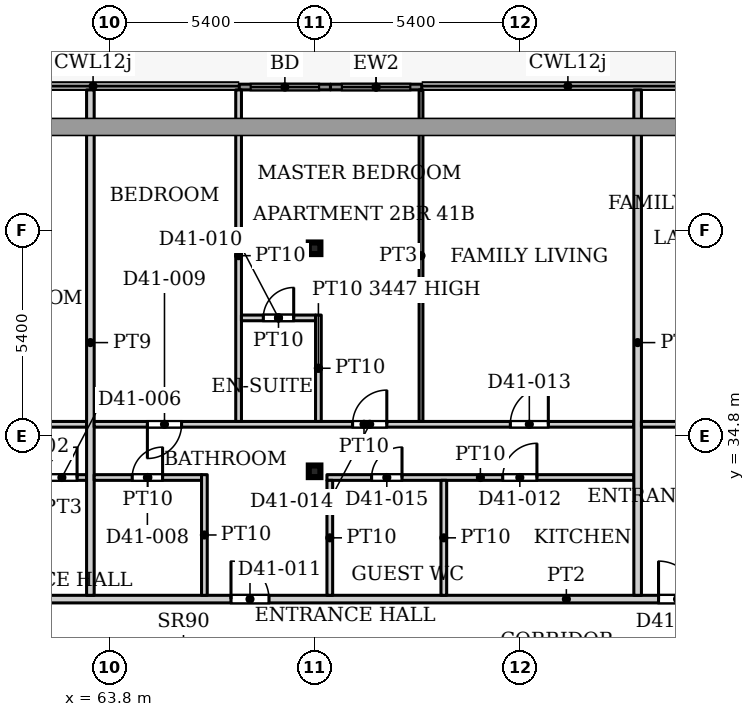
"""IFC4 building model, lengths in metres.
Left out: names, types, materials, properties, quantities, classifications, styles, units other than length and angle.
Written with IfcOpenShell. Run it as: python <this file> out.ifc"""

import sys

from ifc_helpers import new_model, si_unit, direction, frame, frame_2d, origin, origin_2d, place, context, subcontext, project, spatial, rectangle, hollow_rectangle, extrude, source, transform, mapped, element, fill, save


model = new_model("IFC4")
c1 = context("Model", 3, precision=1e-05, world=origin(), true_north=direction((0.0, 1.0)))
c2 = subcontext(c1, "Body", "Model", "MODEL_VIEW")
j1 = project(units=[si_unit("LENGTHUNIT", "METRE"), si_unit("PLANEANGLEUNIT", "RADIAN")], contexts=[c1])
p1 = place(None, origin())
s1 = spatial("IfcSite", under=j1, at=p1, CompositionType="ELEMENT")
p2 = place(p1, origin())
s2 = spatial("IfcBuilding", under=s1, at=p2, CompositionType="ELEMENT")
p3 = place(p2, frame((0.0, 0.0, 176.0)))
s3 = spatial("IfcBuildingStorey", under=s2, at=p3, CompositionType="ELEMENT", Elevation=176.0)
for number, where, z_axis, x_axis in (
    (1, (69.2, 33.863, 0.0), (0.0, 0.0, 1.0), (1.0, 0.0, 0.0)),
    (2, (69.2, 39.732, 0.0), (0.0, 0.0, 1.0), (1.0, 0.0, 0.0)),
):
    element("IfcColumn", number, at=place(p3, frame(where, z_axis=z_axis, x_axis=x_axis)), inside=s3, PredefinedType="COLUMN", context=c2, shape_type="SweptSolid", body=[
        extrude(hollow_rectangle(XDim=0.305, YDim=0.305, WallThickness=0.016, InnerFilletRadius=0.016, OuterFilletRadius=0.032, at=origin_2d()), origin(), (0.0, 0.0, 1.0), 3.9),
    ])
p4 = place(p3, frame((67.218, 43.975, 0.0), z_axis=(0.0, 0.0, 1.0), x_axis=(1.0, 0.0, 0.0)))
e3 = element("IfcWall", 3, at=p4, inside=s3, PredefinedType="SOLIDWALL", context=c2, shape_type="SweptSolid", body=[
    extrude(rectangle(XDim=2.4, YDim=0.15, at=frame_2d((1.2, 0.0))), origin(), (0.0, 0.0, 1.0), 3.75),
])
p5 = place(p4, frame((0.3, 0.0, 0.0)))
e4 = element("IfcOpeningElement", 4, at=p5, cuts=e3, PredefinedType="OPENING", context=c2, shape_type="SweptSolid", body=[
    extrude(rectangle(XDim=1.8, YDim=2.4, at=frame_2d((0.9, 1.2))), frame((0.0, 0.085, 0.0), z_axis=(0.0, -1.0, 0.0), x_axis=(1.0, 0.0, 0.0)), (0.0, 0.0, 1.0), 0.17),
])
p6 = place(p3, frame((69.618, 43.975, 0.0), z_axis=(0.0, 0.0, 1.0), x_axis=(1.0, 0.0, 0.0)))
e5 = element("IfcWall", 5, at=p6, inside=s3, PredefinedType="SOLIDWALL", context=c2, shape_type="SweptSolid", body=[
    extrude(rectangle(XDim=2.4, YDim=0.15, at=frame_2d((1.2, 0.0))), origin(), (0.0, 0.0, 1.0), 3.75),
])
p7 = place(p6, frame((0.3, 0.0, 0.0)))
e6 = element("IfcOpeningElement", 6, at=p7, cuts=e5, PredefinedType="OPENING", context=c2, shape_type="SweptSolid", body=[
    extrude(rectangle(XDim=1.8, YDim=2.4, at=frame_2d((0.9, 1.2))), frame((0.0, 0.085, 0.0), z_axis=(0.0, -1.0, 0.0), x_axis=(1.0, 0.0, 0.0)), (0.0, 0.0, 1.0), 0.17),
])
p8 = place(p3, frame((53.549, 30.5, 0.0), z_axis=(0.0, 0.0, 1.0), x_axis=(1.0, 0.0, 0.0)))
e7 = element("IfcWall", 7, at=p8, inside=s3, PredefinedType="PARTITIONING", context=c2, shape_type="SweptSolid", body=[
    extrude(rectangle(XDim=44.551, YDim=0.2, at=frame_2d((22.275, 0.0))), origin(), (0.0, 0.0, 1.0), 3.6),
])
p9 = place(p8, frame((6.851, 0.0, 0.0)))
e8 = element("IfcOpeningElement", 8, at=p9, cuts=e7, PredefinedType="OPENING", context=c2, shape_type="SweptSolid", body=[
    extrude(rectangle(XDim=1.0, YDim=2.1, at=frame_2d((0.5, 1.05))), frame((0.0, 0.11, 0.0), z_axis=(0.0, -1.0, 0.0), x_axis=(1.0, 0.0, 0.0)), (0.0, 0.0, 1.0), 0.22),
])
p10 = place(p8, frame((13.451, 0.0, 0.0)))
e9 = element("IfcOpeningElement", 9, at=p10, cuts=e7, PredefinedType="OPENING", context=c2, shape_type="SweptSolid", body=[
    extrude(rectangle(XDim=1.0, YDim=2.1, at=frame_2d((0.5, 1.05))), frame((0.0, 0.11, 0.0), z_axis=(0.0, -1.0, 0.0), x_axis=(1.0, 0.0, 0.0)), (0.0, 0.0, 1.0), 0.22),
])
p11 = place(p8, frame((24.701, 0.0, 0.0)))
e10 = element("IfcOpeningElement", 10, at=p11, cuts=e7, PredefinedType="OPENING", context=c2, shape_type="SweptSolid", body=[
    extrude(rectangle(XDim=1.0, YDim=2.1, at=frame_2d((0.5, 1.05))), frame((0.0, 0.11, 0.0), z_axis=(0.0, -1.0, 0.0), x_axis=(1.0, 0.0, 0.0)), (0.0, 0.0, 1.0), 0.22),
])
p12 = place(p8, frame((38.651, 0.0, 0.0)))
e11 = element("IfcOpeningElement", 11, at=p12, cuts=e7, PredefinedType="OPENING", context=c2, shape_type="SweptSolid", body=[
    extrude(rectangle(XDim=1.0, YDim=2.1, at=frame_2d((0.5, 1.05))), frame((0.0, 0.11, 0.0), z_axis=(0.0, -1.0, 0.0), x_axis=(1.0, 0.0, 0.0)), (0.0, 0.0, 1.0), 0.22),
])
p13 = place(p3, frame((53.549, 35.1, 0.0), z_axis=(0.0, 0.0, 1.0), x_axis=(1.0, 0.0, 0.0)))
e12 = element("IfcWall", 12, at=p13, inside=s3, PredefinedType="PARTITIONING", context=c2, shape_type="SweptSolid", body=[
    extrude(rectangle(XDim=9.651, YDim=0.15, at=frame_2d((4.825, 0.0))), origin(), (0.0, 0.0, 1.0), 3.6),
])
p14 = place(p13, frame((7.651, 0.0, 0.0)))
e13 = element("IfcOpeningElement", 13, at=p14, cuts=e12, PredefinedType="OPENING", context=c2, shape_type="SweptSolid", body=[
    extrude(rectangle(XDim=0.9, YDim=2.1, at=frame_2d((0.45, 1.05))), frame((0.0, 0.085, 0.0), z_axis=(0.0, -1.0, 0.0), x_axis=(1.0, 0.0, 0.0)), (0.0, 0.0, 1.0), 0.17),
])
p15 = place(p13, frame((2.651, 0.0, 0.0)))
e14 = element("IfcOpeningElement", 14, at=p15, cuts=e12, PredefinedType="OPENING", context=c2, shape_type="SweptSolid", body=[
    extrude(rectangle(XDim=1.0, YDim=2.1, at=frame_2d((0.5, 1.05))), frame((0.0, 0.085, 0.0), z_axis=(0.0, -1.0, 0.0), x_axis=(1.0, 0.0, 0.0)), (0.0, 0.0, 1.0), 0.17),
])
p16 = place(p3, frame((61.75, 33.7, 0.0), z_axis=(0.0, 0.0, 1.0), x_axis=(1.0, 0.0, 0.0)))
e15 = element("IfcWall", 15, at=p16, inside=s3, PredefinedType="PARTITIONING", context=c2, shape_type="SweptSolid", body=[
    extrude(rectangle(XDim=1.45, YDim=0.15, at=frame_2d((0.725, 0.0))), origin(), (0.0, 0.0, 1.0), 3.6),
])
p17 = place(p16, frame((0.4, 0.0, 0.0)))
e16 = element("IfcOpeningElement", 16, at=p17, cuts=e15, PredefinedType="OPENING", context=c2, shape_type="SweptSolid", body=[
    extrude(rectangle(XDim=0.8, YDim=2.1, at=frame_2d((0.4, 1.05))), frame((0.0, 0.085, 0.0), z_axis=(0.0, -1.0, 0.0), x_axis=(1.0, 0.0, 0.0)), (0.0, 0.0, 1.0), 0.17),
])
p18 = place(p3, frame((63.3, 30.6, 0.0), z_axis=(0.0, 0.0, 1.0), x_axis=(0.0, 1.0, 0.0)))
e17 = element("IfcWall", 17, at=p18, inside=s3, PredefinedType="PARTITIONING", context=c2, shape_type="SweptSolid", body=[
    extrude(rectangle(XDim=13.3, YDim=0.2, at=frame_2d((6.65, 0.0))), origin(), (0.0, 0.0, 1.0), 3.6),
])
p19 = place(p3, frame((63.4, 33.7, 0.0), z_axis=(0.0, 0.0, 1.0), x_axis=(1.0, 0.0, 0.0)))
e18 = element("IfcWall", 18, at=p19, inside=s3, PredefinedType="PARTITIONING", context=c2, shape_type="SweptSolid", body=[
    extrude(rectangle(XDim=2.825, YDim=0.15, at=frame_2d((1.413, 0.0))), origin(), (0.0, 0.0, 1.0), 3.6),
])
p20 = place(p19, frame((1.0, 0.0, 0.0)))
e19 = element("IfcOpeningElement", 19, at=p20, cuts=e18, PredefinedType="OPENING", context=c2, shape_type="SweptSolid", body=[
    extrude(rectangle(XDim=0.8, YDim=2.1, at=frame_2d((0.4, 1.05))), frame((0.0, 0.085, 0.0), z_axis=(0.0, -1.0, 0.0), x_axis=(1.0, 0.0, 0.0)), (0.0, 0.0, 1.0), 0.17),
])
p21 = place(p3, frame((63.4, 35.1, 0.0), z_axis=(0.0, 0.0, 1.0), x_axis=(1.0, 0.0, 0.0)))
e20 = element("IfcWall", 20, at=p21, inside=s3, PredefinedType="PARTITIONING", context=c2, shape_type="SweptSolid", body=[
    extrude(rectangle(XDim=14.2, YDim=0.15, at=frame_2d((7.1, 0.0))), origin(), (0.0, 0.0, 1.0), 3.6),
])
p22 = place(p21, frame((1.4, 0.0, 0.0)))
e21 = element("IfcOpeningElement", 21, at=p22, cuts=e20, PredefinedType="OPENING", context=c2, shape_type="SweptSolid", body=[
    extrude(rectangle(XDim=0.9, YDim=2.1, at=frame_2d((0.45, 1.05))), frame((0.0, 0.085, 0.0), z_axis=(0.0, -1.0, 0.0), x_axis=(1.0, 0.0, 0.0)), (0.0, 0.0, 1.0), 0.17),
])
p23 = place(p21, frame((10.95, 0.0, 0.0)))
e22 = element("IfcOpeningElement", 22, at=p23, cuts=e20, PredefinedType="OPENING", context=c2, shape_type="SweptSolid", body=[
    extrude(rectangle(XDim=1.0, YDim=2.1, at=frame_2d((0.5, 1.05))), frame((0.0, 0.085, 0.0), z_axis=(0.0, -1.0, 0.0), x_axis=(1.0, 0.0, 0.0)), (0.0, 0.0, 1.0), 0.17),
])
p24 = place(p21, frame((6.8, 0.0, 0.0)))
e23 = element("IfcOpeningElement", 23, at=p24, cuts=e20, PredefinedType="OPENING", context=c2, shape_type="SweptSolid", body=[
    extrude(rectangle(XDim=0.9, YDim=2.1, at=frame_2d((0.45, 1.05))), frame((0.0, 0.085, 0.0), z_axis=(0.0, -1.0, 0.0), x_axis=(1.0, 0.0, 0.0)), (0.0, 0.0, 1.0), 0.17),
])
p25 = place(p3, frame((66.3, 30.6, 0.0), z_axis=(0.0, 0.0, 1.0), x_axis=(0.0, 1.0, 0.0)))
e24 = element("IfcWall", 24, at=p25, inside=s3, PredefinedType="PARTITIONING", context=c2, shape_type="SweptSolid", body=[
    extrude(rectangle(XDim=3.175, YDim=0.15, at=frame_2d((1.587, 0.0))), origin(), (0.0, 0.0, 1.0), 3.6),
])
p26 = place(p3, frame((67.2, 35.175, 0.0), z_axis=(0.0, 0.0, 1.0), x_axis=(0.0, 1.0, 0.0)))
e25 = element("IfcWall", 25, at=p26, inside=s3, PredefinedType="PARTITIONING", context=c2, shape_type="SweptSolid", body=[
    extrude(rectangle(XDim=8.725, YDim=0.15, at=frame_2d((4.362, 0.0))), origin(), (0.0, 0.0, 1.0), 3.6),
])
p27 = place(p3, frame((67.275, 37.9, 0.0), z_axis=(0.0, 0.0, 1.0), x_axis=(1.0, 0.0, 0.0)))
e26 = element("IfcWall", 26, at=p27, inside=s3, PredefinedType="PARTITIONING", context=c2, shape_type="SweptSolid", body=[
    extrude(rectangle(XDim=1.95, YDim=0.15, at=frame_2d((0.975, 0.0))), origin(), (0.0, 0.0, 1.0), 3.6),
])
p28 = place(p27, frame((0.575, 0.0, 0.0)))
e27 = element("IfcOpeningElement", 27, at=p28, cuts=e26, PredefinedType="OPENING", context=c2, shape_type="SweptSolid", body=[
    extrude(rectangle(XDim=0.8, YDim=2.1, at=frame_2d((0.4, 1.05))), frame((0.0, 0.085, 0.0), z_axis=(0.0, -1.0, 0.0), x_axis=(1.0, 0.0, 0.0)), (0.0, 0.0, 1.0), 0.17),
])
p29 = place(p3, frame((69.3, 35.175, 0.0), z_axis=(0.0, 0.0, 1.0), x_axis=(0.0, 1.0, 0.0)))
e28 = element("IfcWall", 28, at=p29, inside=s3, PredefinedType="PARTITIONING", context=c2, shape_type="SweptSolid", body=[
    extrude(rectangle(XDim=2.8, YDim=0.15, at=frame_2d((1.4, 0.0))), origin(), (0.0, 0.0, 1.0), 3.447),
])
p30 = place(p3, frame((69.525, 33.7, 0.0), z_axis=(0.0, 0.0, 1.0), x_axis=(1.0, 0.0, 0.0)))
e29 = element("IfcWall", 29, at=p30, inside=s3, PredefinedType="PARTITIONING", context=c2, shape_type="SweptSolid", body=[
    extrude(rectangle(XDim=8.075, YDim=0.15, at=frame_2d((4.038, 0.0))), origin(), (0.0, 0.0, 1.0), 3.6),
])
p31 = place(p30, frame((4.625, 0.0, 0.0)))
e30 = element("IfcOpeningElement", 30, at=p31, cuts=e29, PredefinedType="OPENING", context=c2, shape_type="SweptSolid", body=[
    extrude(rectangle(XDim=0.9, YDim=2.1, at=frame_2d((0.45, 1.05))), frame((0.0, 0.085, 0.0), z_axis=(0.0, -1.0, 0.0), x_axis=(1.0, 0.0, 0.0)), (0.0, 0.0, 1.0), 0.17),
])
p32 = place(p30, frame((1.175, 0.0, 0.0)))
e31 = element("IfcOpeningElement", 31, at=p32, cuts=e29, PredefinedType="OPENING", context=c2, shape_type="SweptSolid", body=[
    extrude(rectangle(XDim=0.8, YDim=2.1, at=frame_2d((0.4, 1.05))), frame((0.0, 0.085, 0.0), z_axis=(0.0, -1.0, 0.0), x_axis=(1.0, 0.0, 0.0)), (0.0, 0.0, 1.0), 0.17),
])
p33 = place(p3, frame((69.6, 30.6, 0.0), z_axis=(0.0, 0.0, 1.0), x_axis=(0.0, 1.0, 0.0)))
e32 = element("IfcWall", 32, at=p33, inside=s3, PredefinedType="PARTITIONING", context=c2, shape_type="SweptSolid", body=[
    extrude(rectangle(XDim=3.025, YDim=0.15, at=frame_2d((1.512, 0.0))), origin(), (0.0, 0.0, 1.0), 3.6),
])
p34 = place(p3, frame((72.0, 35.175, 0.0), z_axis=(0.0, 0.0, 1.0), x_axis=(0.0, 1.0, 0.0)))
e33 = element("IfcWall", 33, at=p34, inside=s3, PredefinedType="PARTITIONING", context=c2, shape_type="SweptSolid", body=[
    extrude(rectangle(XDim=8.725, YDim=0.1, at=frame_2d((4.362, 0.0))), origin(), (0.0, 0.0, 1.0), 3.6),
])
p35 = place(p3, frame((72.6, 30.6, 0.0), z_axis=(0.0, 0.0, 1.0), x_axis=(0.0, 1.0, 0.0)))
e34 = element("IfcWall", 34, at=p35, inside=s3, PredefinedType="PARTITIONING", context=c2, shape_type="SweptSolid", body=[
    extrude(rectangle(XDim=3.025, YDim=0.15, at=frame_2d((1.512, 0.0))), origin(), (0.0, 0.0, 1.0), 3.6),
])
p36 = place(p3, frame((77.7, 30.6, 0.0), z_axis=(0.0, 0.0, 1.0), x_axis=(0.0, 1.0, 0.0)))
e35 = element("IfcWall", 35, at=p36, inside=s3, PredefinedType="PARTITIONING", context=c2, shape_type="SweptSolid", body=[
    extrude(rectangle(XDim=13.3, YDim=0.2, at=frame_2d((6.65, 0.0))), origin(), (0.0, 0.0, 1.0), 3.6),
])
p37 = place(p3, frame((77.8, 35.1, 0.0), z_axis=(0.0, 0.0, 1.0), x_axis=(1.0, 0.0, 0.0)))
e36 = element("IfcWall", 36, at=p37, inside=s3, PredefinedType="PARTITIONING", context=c2, shape_type="SweptSolid", body=[
    extrude(rectangle(XDim=11.8, YDim=0.15, at=frame_2d((5.9, 0.0))), origin(), (0.0, 0.0, 1.0), 3.6),
])
p38 = place(p37, frame((5.6, 0.0, 0.0)))
e37 = element("IfcOpeningElement", 37, at=p38, cuts=e36, PredefinedType="OPENING", context=c2, shape_type="SweptSolid", body=[
    extrude(rectangle(XDim=0.9, YDim=2.1, at=frame_2d((0.45, 1.05))), frame((0.0, 0.085, 0.0), z_axis=(0.0, -1.0, 0.0), x_axis=(1.0, 0.0, 0.0)), (0.0, 0.0, 1.0), 0.17),
])
p39 = place(p37, frame((1.5, 0.0, 0.0)))
e38 = element("IfcOpeningElement", 38, at=p39, cuts=e36, PredefinedType="OPENING", context=c2, shape_type="SweptSolid", body=[
    extrude(rectangle(XDim=1.0, YDim=2.1, at=frame_2d((0.5, 1.05))), frame((0.0, 0.085, 0.0), z_axis=(0.0, -1.0, 0.0), x_axis=(1.0, 0.0, 0.0)), (0.0, 0.0, 1.0), 0.17),
])
p40 = place(p37, frame((8.45, 0.0, 0.0)))
e39 = element("IfcOpeningElement", 39, at=p40, cuts=e36, PredefinedType="OPENING", context=c2, shape_type="SweptSolid", body=[
    extrude(rectangle(XDim=0.9, YDim=2.1, at=frame_2d((0.45, 1.05))), frame((0.0, 0.085, 0.0), z_axis=(0.0, -1.0, 0.0), x_axis=(1.0, 0.0, 0.0)), (0.0, 0.0, 1.0), 0.17),
])
m1 = source(origin(), c2, "Body", "SweptSolid", [
    extrude(rectangle(XDim=1.8, YDim=2.4, at=frame_2d((0.9, 1.2))), frame((0.0, 0.025, 0.0), z_axis=(0.0, -1.0, 0.0), x_axis=(1.0, 0.0, 0.0)), (0.0, 0.0, 1.0), 0.05),
])
p41 = place(p5, origin())
e40 = element("IfcDoor", 40, at=p41, inside=s3, OperationType="SLIDING_TO_LEFT", PredefinedType="DOOR", context=c2, shape_type="MappedRepresentation", body=[
    mapped(m1, transform((0.0, 0.0, 0.0), x_axis=(1.0, 0.0, 0.0), y_axis=(0.0, 1.0, 0.0), z_axis=(0.0, 0.0, 1.0), scale=1.0)),
])
fill(e4, e40)
p42 = place(p7, origin())
e41 = element("IfcDoor", 41, at=p42, inside=s3, OperationType="SLIDING_TO_LEFT", PredefinedType="DOOR", context=c2, shape_type="MappedRepresentation", body=[
    mapped(m1, transform((0.0, 0.0, 0.0), x_axis=(1.0, 0.0, 0.0), y_axis=(0.0, 1.0, 0.0), z_axis=(0.0, 0.0, 1.0), scale=1.0)),
])
fill(e6, e41)
m2 = source(origin(), c2, "Body", "SweptSolid", [
    extrude(rectangle(XDim=0.8, YDim=2.1, at=frame_2d((0.4, 1.05))), frame((0.0, 0.025, 0.0), z_axis=(0.0, -1.0, 0.0), x_axis=(1.0, 0.0, 0.0)), (0.0, 0.0, 1.0), 0.05),
])
p43 = place(p17, origin())
e42 = element("IfcDoor", 42, at=p43, inside=s3, OperationType="SINGLE_SWING_LEFT", PredefinedType="DOOR", context=c2, shape_type="MappedRepresentation", body=[
    mapped(m2, transform((0.0, 0.0, 0.0), x_axis=(1.0, 0.0, 0.0), y_axis=(0.0, 1.0, 0.0), z_axis=(0.0, 0.0, 1.0), scale=1.0)),
])
fill(e16, e42)
p44 = place(p20, origin())
e43 = element("IfcDoor", 43, at=p44, inside=s3, OperationType="SINGLE_SWING_LEFT", PredefinedType="DOOR", context=c2, shape_type="MappedRepresentation", body=[
    mapped(m2, transform((0.0, 0.0, 0.0), x_axis=(1.0, 0.0, 0.0), y_axis=(0.0, 1.0, 0.0), z_axis=(0.0, 0.0, 1.0), scale=1.0)),
])
fill(e19, e43)
m3 = source(origin(), c2, "Body", "SweptSolid", [
    extrude(rectangle(XDim=0.9, YDim=2.1, at=frame_2d((0.45, 1.05))), frame((0.0, 0.025, 0.0), z_axis=(0.0, -1.0, 0.0), x_axis=(1.0, 0.0, 0.0)), (0.0, 0.0, 1.0), 0.05),
])
p45 = place(p22, origin())
e44 = element("IfcDoor", 44, at=p45, inside=s3, OperationType="SINGLE_SWING_RIGHT", PredefinedType="DOOR", context=c2, shape_type="MappedRepresentation", body=[
    mapped(m3, transform((0.0, 0.0, 0.0), x_axis=(1.0, 0.0, 0.0), y_axis=(0.0, 1.0, 0.0), z_axis=(0.0, 0.0, 1.0), scale=1.0)),
])
fill(e21, e44)
p46 = place(p28, origin())
e45 = element("IfcDoor", 45, at=p46, inside=s3, OperationType="SINGLE_SWING_LEFT", PredefinedType="DOOR", context=c2, shape_type="MappedRepresentation", body=[
    mapped(m2, transform((0.0, 0.0, 0.0), x_axis=(1.0, 0.0, 0.0), y_axis=(0.0, 1.0, 0.0), z_axis=(0.0, 0.0, 1.0), scale=1.0)),
])
fill(e27, e45)
m4 = source(origin(), c2, "Body", "SweptSolid", [
    extrude(rectangle(XDim=1.0, YDim=2.1, at=frame_2d((0.5, 1.05))), frame((0.0, 0.025, 0.0), z_axis=(0.0, -1.0, 0.0), x_axis=(1.0, 0.0, 0.0)), (0.0, 0.0, 1.0), 0.05),
])
p47 = place(p10, origin())
e46 = element("IfcDoor", 46, at=p47, inside=s3, OperationType="SINGLE_SWING_LEFT", PredefinedType="DOOR", context=c2, shape_type="MappedRepresentation", body=[
    mapped(m4, transform((0.0, 0.0, 0.0), x_axis=(1.0, 0.0, 0.0), y_axis=(0.0, 1.0, 0.0), z_axis=(0.0, 0.0, 1.0), scale=1.0)),
])
fill(e9, e46)
p48 = place(p31, origin())
e47 = element("IfcDoor", 47, at=p48, inside=s3, OperationType="SINGLE_SWING_LEFT", PredefinedType="DOOR", context=c2, shape_type="MappedRepresentation", body=[
    mapped(m3, transform((0.0, 0.0, 0.0), x_axis=(1.0, 0.0, 0.0), y_axis=(0.0, 1.0, 0.0), z_axis=(0.0, 0.0, 1.0), scale=1.0)),
])
fill(e30, e47)
m5 = source(origin(), c2, "Body", "SweptSolid", [
    extrude(rectangle(XDim=1.0, YDim=2.1, at=frame_2d((0.5, 1.05))), frame((0.0, 0.025, 0.0), z_axis=(0.0, -1.0, 0.0), x_axis=(1.0, 0.0, 0.0)), (0.0, 0.0, 1.0), 0.05),
])
p49 = place(p23, origin())
e48 = element("IfcDoor", 48, at=p49, inside=s3, OperationType="SINGLE_SWING_LEFT", PredefinedType="DOOR", context=c2, shape_type="MappedRepresentation", body=[
    mapped(m5, transform((0.0, 0.0, 0.0), x_axis=(1.0, 0.0, 0.0), y_axis=(0.0, 1.0, 0.0), z_axis=(0.0, 0.0, 1.0), scale=1.0)),
])
fill(e22, e48)
p50 = place(p24, origin())
e49 = element("IfcDoor", 49, at=p50, inside=s3, OperationType="SINGLE_SWING_LEFT", PredefinedType="DOOR", context=c2, shape_type="MappedRepresentation", body=[
    mapped(m3, transform((0.0, 0.0, 0.0), x_axis=(1.0, 0.0, 0.0), y_axis=(0.0, 1.0, 0.0), z_axis=(0.0, 0.0, 1.0), scale=1.0)),
])
fill(e23, e49)
p51 = place(p32, origin())
e50 = element("IfcDoor", 50, at=p51, inside=s3, OperationType="SINGLE_SWING_LEFT", PredefinedType="DOOR", context=c2, shape_type="MappedRepresentation", body=[
    mapped(m2, transform((0.0, 0.0, 0.0), x_axis=(1.0, 0.0, 0.0), y_axis=(0.0, 1.0, 0.0), z_axis=(0.0, 0.0, 1.0), scale=1.0)),
])
fill(e31, e50)
p52 = place(p11, origin())
e51 = element("IfcDoor", 51, at=p52, inside=s3, OperationType="SINGLE_SWING_LEFT", PredefinedType="DOOR", context=c2, shape_type="MappedRepresentation", body=[
    mapped(m4, transform((0.0, 0.0, 0.0), x_axis=(1.0, 0.0, 0.0), y_axis=(0.0, 1.0, 0.0), z_axis=(0.0, 0.0, 1.0), scale=1.0)),
])
fill(e10, e51)
save(model, sys.argv[1])
